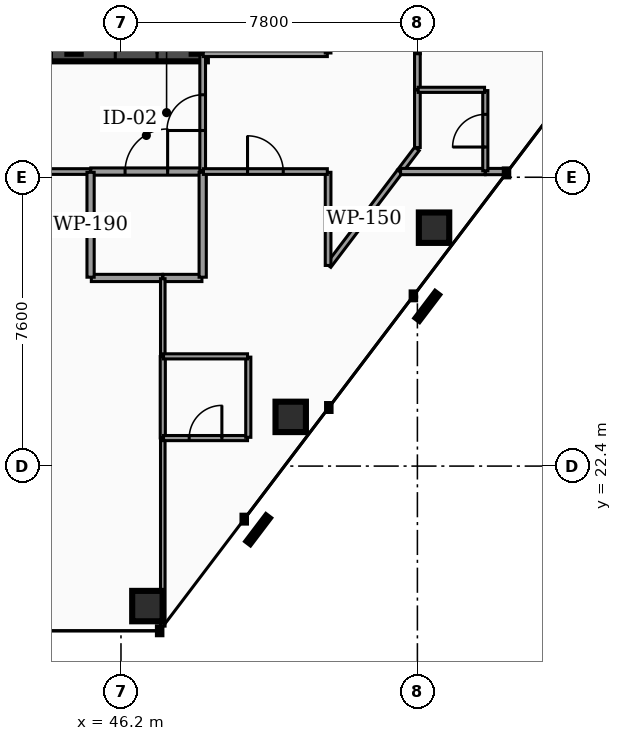
"""IFC4 building model, lengths in metres.
Left out: names, types, materials, properties, quantities, classifications, styles, units other than length and angle.
Written with IfcOpenShell. Run it as: python <this file> out.ifc"""

import sys

from ifc_helpers import new_model, si_unit, direction, frame, frame_2d, origin, origin_2d, place, context, subcontext, project, spatial, rectangle, hollow_rectangle, extrude, element, fill, save


model = new_model("IFC4")
c1 = context("Model", 3, precision=1e-05, world=origin(), true_north=direction((0.0, 1.0)))
c2 = subcontext(c1, "Body", "Model", "MODEL_VIEW")
j1 = project(units=[si_unit("LENGTHUNIT", "METRE"), si_unit("PLANEANGLEUNIT", "RADIAN")], contexts=[c1])
p1 = place(None, origin())
s1 = spatial("IfcSite", under=j1, at=p1, CompositionType="ELEMENT")
p2 = place(p1, origin())
s2 = spatial("IfcBuilding", under=s1, at=p2, CompositionType="ELEMENT")
p3 = place(p2, frame((0.0, 0.0, 123.42)))
s3 = spatial("IfcBuildingStorey", under=s2, at=p3, CompositionType="ELEMENT", Elevation=123.42)
p4 = place(p3, frame((28.4, 33.25, 0.0), z_axis=(0.0, 0.0, 1.0), x_axis=(1.0, 0.0, 0.0)))
e1 = element("IfcWall", 1, at=p4, inside=s3, PredefinedType="SHEAR", context=c2, shape_type="SweptSolid", body=[
    extrude(rectangle(XDim=20.06, YDim=0.4, at=frame_2d((10.03, 0.0))), origin(), (0.0, 0.0, 1.0), 3.5),
])
p5 = place(p4, frame((4.03, 0.0, 0.0)))
e2 = element("IfcOpeningElement", 2, at=p5, cuts=e1, PredefinedType="OPENING", context=c2, shape_type="SweptSolid", body=[
    extrude(rectangle(XDim=1.1, YDim=2.15, at=frame_2d((0.55, 1.075))), frame((0.0, 0.21, 0.0), z_axis=(0.0, -1.0, 0.0), x_axis=(1.0, 0.0, 0.0)), (0.0, 0.0, 1.0), 0.42),
])
p6 = place(p4, frame((14.87, 0.0, 0.0)))
e3 = element("IfcOpeningElement", 3, at=p6, cuts=e1, PredefinedType="OPENING", context=c2, shape_type="SweptSolid", body=[
    extrude(rectangle(XDim=1.1, YDim=2.15, at=frame_2d((0.55, 1.075))), frame((0.0, 0.21, 0.0), z_axis=(0.0, -1.0, 0.0), x_axis=(1.0, 0.0, 0.0)), (0.0, 0.0, 1.0), 0.42),
])
p7 = place(p4, frame((5.95, 0.0, 0.0)))
e4 = element("IfcOpeningElement", 4, at=p7, cuts=e1, PredefinedType="OPENING", context=c2, shape_type="SweptSolid", body=[
    extrude(rectangle(XDim=1.0, YDim=2.1, at=frame_2d((0.5, 1.05))), frame((0.0, 0.21, 0.0), z_axis=(0.0, -1.0, 0.0), x_axis=(1.0, 0.0, 0.0)), (0.0, 0.0, 1.0), 0.42),
])
p8 = place(p4, frame((7.65, 0.0, 0.0)))
e5 = element("IfcOpeningElement", 5, at=p8, cuts=e1, PredefinedType="OPENING", context=c2, shape_type="SweptSolid", body=[
    extrude(rectangle(XDim=1.0, YDim=2.1, at=frame_2d((0.5, 1.05))), frame((0.0, 0.21, 0.0), z_axis=(0.0, -1.0, 0.0), x_axis=(1.0, 0.0, 0.0)), (0.0, 0.0, 1.0), 0.42),
])
p9 = place(p4, frame((1.31, 0.0, 0.0)))
e6 = element("IfcOpeningElement", 6, at=p9, cuts=e1, PredefinedType="OPENING", context=c2, shape_type="SweptSolid", body=[
    extrude(rectangle(XDim=1.1, YDim=2.2, at=frame_2d((0.55, 1.1))), frame((0.0, 0.21, 0.0), z_axis=(0.0, -1.0, 0.0), x_axis=(1.0, 0.0, 0.0)), (0.0, 0.0, 1.0), 0.42),
])
p10 = place(p4, frame((9.44, 0.0, 0.0)))
e7 = element("IfcOpeningElement", 7, at=p10, cuts=e1, PredefinedType="OPENING", context=c2, shape_type="SweptSolid", body=[
    extrude(rectangle(XDim=1.12, YDim=2.05, at=frame_2d((0.56, 1.025))), frame((0.0, 0.21, 0.0), z_axis=(0.0, -1.0, 0.0), x_axis=(1.0, 0.0, 0.0)), (0.0, 0.0, 1.0), 0.42),
])
p11 = place(p4, frame((17.65, 0.0, 0.0)))
e8 = element("IfcOpeningElement", 8, at=p11, cuts=e1, PredefinedType="OPENING", context=c2, shape_type="SweptSolid", body=[
    extrude(rectangle(XDim=1.1, YDim=2.2, at=frame_2d((0.55, 1.1))), frame((0.0, 0.21, 0.0), z_axis=(0.0, -1.0, 0.0), x_axis=(1.0, 0.0, 0.0)), (0.0, 0.0, 1.0), 0.42),
])
p12 = place(p3, frame((44.965, 33.25, 0.0), z_axis=(0.0, 0.0, 1.0), x_axis=(0.0, 1.0, 0.0)))
e9 = element("IfcWall", 9, at=p12, inside=s3, PredefinedType="SHEAR", context=c2, shape_type="SweptSolid", body=[
    extrude(rectangle(XDim=10.2, YDim=0.35, at=frame_2d((5.1, 0.0))), origin(), (0.0, 0.0, 1.0), 3.5),
])
p13 = place(p3, frame((48.26, 33.25, 0.0), z_axis=(0.0, 0.0, 1.0), x_axis=(0.0, 1.0, 0.0)))
e10 = element("IfcWall", 10, at=p13, inside=s3, PredefinedType="SHEAR", context=c2, shape_type="SweptSolid", body=[
    extrude(rectangle(XDim=10.2, YDim=0.4, at=frame_2d((5.1, 0.0))), origin(), (0.0, 0.0, 1.0), 3.5),
])
for number, where, z_axis, x_axis in (
    (11, (46.895, 18.716, 0.0), (0.0, 0.0, 1.0), (1.0, 0.0, 0.0)),
    (12, (50.666, 23.695, 0.0), (0.0, 0.0, 1.0), (1.0, 0.0, 0.0)),
    (13, (54.438, 28.673, 0.0), (0.0, 0.0, 1.0), (1.0, 0.0, 0.0)),
):
    element("IfcColumn", number, at=place(p3, frame(where, z_axis=z_axis, x_axis=x_axis)), inside=s3, PredefinedType="COLUMN", context=c2, shape_type="SweptSolid", body=[
        extrude(hollow_rectangle(XDim=0.8, YDim=0.8, WallThickness=0.04, at=origin_2d()), origin(), (0.0, 0.0, 1.0), 3.5),
    ])
p14 = place(p3, frame((45.405, 30.15, 0.0), z_axis=(0.0, 0.0, 1.0), x_axis=(1.0, 0.0, 0.0)))
e14 = element("IfcWall", 14, at=p14, inside=s3, PredefinedType="PARTITIONING", context=c2, shape_type="SweptSolid", body=[
    extrude(rectangle(XDim=2.925, YDim=0.19, at=frame_2d((1.462, 0.0))), origin(), (0.0, 0.0, 1.0), 2.457),
])
p15 = place(p14, frame((0.903, 0.0, 0.0)))
e15 = element("IfcOpeningElement", 15, at=p15, cuts=e14, PredefinedType="OPENING", context=c2, shape_type="SweptSolid", body=[
    extrude(rectangle(XDim=1.12, YDim=2.05, at=frame_2d((0.56, 1.025))), frame((0.0, 0.105, 0.0), z_axis=(0.0, -1.0, 0.0), x_axis=(1.0, 0.0, 0.0)), (0.0, 0.0, 1.0), 0.21),
])
p16 = place(p3, frame((48.35, 30.17, 0.0), z_axis=(0.0, 0.0, 1.0), x_axis=(0.0, 1.0, 0.0)))
e16 = element("IfcWall", 16, at=p16, inside=s3, PredefinedType="PARTITIONING", context=c2, shape_type="SweptSolid", body=[
    extrude(rectangle(XDim=3.06, YDim=0.15, at=frame_2d((1.53, 0.0))), origin(), (0.0, 0.0, 1.0), 2.457),
])
p17 = place(p16, frame((1.06, 0.0, 0.0)))
e17 = element("IfcOpeningElement", 17, at=p17, cuts=e16, PredefinedType="OPENING", context=c2, shape_type="SweptSolid", body=[
    extrude(rectangle(XDim=0.94, YDim=2.05, at=frame_2d((0.47, 1.025))), frame((0.0, 0.085, 0.0), z_axis=(0.0, -1.0, 0.0), x_axis=(1.0, 0.0, 0.0)), (0.0, 0.0, 1.0), 0.17),
])
p18 = place(p3, frame((35.385, 30.15, 0.0), z_axis=(0.0, 0.0, 1.0), x_axis=(1.0, 0.0, 0.0)))
e18 = element("IfcWall", 18, at=p18, inside=s3, PredefinedType="PARTITIONING", context=c2, shape_type="SweptSolid", body=[
    extrude(rectangle(XDim=10.01, YDim=0.15, at=frame_2d((5.005, 0.0))), origin(), (0.0, 0.0, 1.0), 2.457),
])
p19 = place(p18, frame((7.935, 0.0, 0.0)))
e19 = element("IfcOpeningElement", 19, at=p19, cuts=e18, PredefinedType="OPENING", context=c2, shape_type="SweptSolid", body=[
    extrude(rectangle(XDim=0.94, YDim=2.05, at=frame_2d((0.47, 1.025))), frame((0.0, 0.085, 0.0), z_axis=(0.0, -1.0, 0.0), x_axis=(1.0, 0.0, 0.0)), (0.0, 0.0, 1.0), 0.17),
])
p20 = place(p3, frame((45.42, 27.35, 0.0), z_axis=(0.0, 0.0, 1.0), x_axis=(1.0, 0.0, 0.0)))
e20 = element("IfcWall", 20, at=p20, inside=s3, PredefinedType="PARTITIONING", context=c2, shape_type="SweptSolid", body=[
    extrude(rectangle(XDim=1.875, YDim=0.19, at=frame_2d((0.938, 0.0))), origin(), (0.0, 0.0, 1.0), 2.457),
])
p21 = place(p3, frame((45.4, 27.37, 0.0), z_axis=(0.0, 0.0, 1.0), x_axis=(0.0, 1.0, 0.0)))
e21 = element("IfcWall", 21, at=p21, inside=s3, PredefinedType="PARTITIONING", context=c2, shape_type="SweptSolid", body=[
    extrude(rectangle(XDim=2.76, YDim=0.19, at=frame_2d((1.38, 0.0))), origin(), (0.0, 0.0, 1.0), 2.457),
])
p22 = place(p3, frame((47.305, 27.35, 0.0), z_axis=(0.0, 0.0, 1.0), x_axis=(1.0, 0.0, 0.0)))
e22 = element("IfcWall", 22, at=p22, inside=s3, PredefinedType="PARTITIONING", context=c2, shape_type="SweptSolid", body=[
    extrude(rectangle(XDim=1.025, YDim=0.19, at=frame_2d((0.513, 0.0))), origin(), (0.0, 0.0, 1.0), 2.457),
])
p23 = place(p3, frame((48.35, 27.37, 0.0), z_axis=(0.0, 0.0, 1.0), x_axis=(0.0, 1.0, 0.0)))
e23 = element("IfcWall", 23, at=p23, inside=s3, PredefinedType="PARTITIONING", context=c2, shape_type="SweptSolid", body=[
    extrude(rectangle(XDim=2.76, YDim=0.19, at=frame_2d((1.38, 0.0))), origin(), (0.0, 0.0, 1.0), 2.457),
])
p24 = place(p3, frame((51.662, 27.675, 0.0), z_axis=(0.0, 0.0, 1.0), x_axis=(0.603831940294, 0.797111653334, 0.0)))
e24 = element("IfcWall", 24, at=p24, inside=s3, PredefinedType="PARTITIONING", context=c2, shape_type="SweptSolid", body=[
    extrude(rectangle(XDim=3.104, YDim=0.15, at=frame_2d((1.552, 0.0))), origin(), (0.0, 0.0, 1.0), 2.457),
])
p25 = place(p3, frame((51.65, 27.679, 0.0), z_axis=(0.0, 0.0, 1.0), x_axis=(0.0, 1.0, 0.0)))
e25 = element("IfcWall", 25, at=p25, inside=s3, PredefinedType="PARTITIONING", context=c2, shape_type="SweptSolid", body=[
    extrude(rectangle(XDim=2.451, YDim=0.15, at=frame_2d((1.225, 0.0))), origin(), (0.0, 0.0, 1.0), 2.457),
])
p26 = place(p3, frame((48.37, 30.15, 0.0), z_axis=(0.0, 0.0, 1.0), x_axis=(1.0, 0.0, 0.0)))
e26 = element("IfcWall", 26, at=p26, inside=s3, PredefinedType="PARTITIONING", context=c2, shape_type="SweptSolid", body=[
    extrude(rectangle(XDim=3.26, YDim=0.15, at=frame_2d((1.63, 0.0))), origin(), (0.0, 0.0, 1.0), 2.457),
])
p27 = place(p26, frame((1.16, 0.0, 0.0)))
e27 = element("IfcOpeningElement", 27, at=p27, cuts=e26, PredefinedType="OPENING", context=c2, shape_type="SweptSolid", body=[
    extrude(rectangle(XDim=0.94, YDim=2.05, at=frame_2d((0.47, 1.025))), frame((0.0, 0.085, 0.0), z_axis=(0.0, -1.0, 0.0), x_axis=(1.0, 0.0, 0.0)), (0.0, 0.0, 1.0), 0.17),
])
p28 = place(p3, frame((54.0, 33.25, 0.0), z_axis=(0.0, 0.0, 1.0), x_axis=(0.0, 1.0, 0.0)))
e28 = element("IfcWall", 28, at=p28, inside=s3, PredefinedType="PARTITIONING", context=c2, shape_type="SweptSolid", body=[
    extrude(rectangle(XDim=6.423, YDim=0.15, at=frame_2d((3.212, 0.0))), origin(), (0.0, 0.0, 1.0), 2.457),
])
p29 = place(p28, frame((2.742, 0.0, 0.0)))
e29 = element("IfcOpeningElement", 29, at=p29, cuts=e28, PredefinedType="OPENING", context=c2, shape_type="SweptSolid", body=[
    extrude(rectangle(XDim=0.94, YDim=2.05, at=frame_2d((0.47, 1.025))), frame((0.0, 0.085, 0.0), z_axis=(0.0, -1.0, 0.0), x_axis=(1.0, 0.0, 0.0)), (0.0, 0.0, 1.0), 0.17),
])
p30 = place(p3, frame((54.0, 32.305, 0.0), z_axis=(0.0, 0.0, 1.0), x_axis=(0.0, 1.0, 0.0)))
e30 = element("IfcWall", 30, at=p30, inside=s3, PredefinedType="PARTITIONING", context=c2, shape_type="SweptSolid", body=[
    extrude(rectangle(XDim=0.945, YDim=0.15, at=frame_2d((0.473, 0.0))), origin(), (0.0, 0.0, 1.0), 2.457),
])
p31 = place(p3, frame((54.0, 30.781, 0.0), z_axis=(0.0, 0.0, 1.0), x_axis=(0.0, 1.0, 0.0)))
e31 = element("IfcWall", 31, at=p31, inside=s3, PredefinedType="PARTITIONING", context=c2, shape_type="SweptSolid", body=[
    extrude(rectangle(XDim=1.514, YDim=0.15, at=frame_2d((0.757, 0.0))), origin(), (0.0, 0.0, 1.0), 2.457),
])
p32 = place(p3, frame((53.54, 30.154, 0.0), z_axis=(0.0, 0.0, 1.0), x_axis=(0.603680225987, 0.797226557982, 0.0)))
e32 = element("IfcWall", 32, at=p32, inside=s3, PredefinedType="PARTITIONING", context=c2, shape_type="SweptSolid", body=[
    extrude(rectangle(XDim=0.742, YDim=0.15, at=frame_2d((0.371, 0.0))), origin(), (0.0, 0.0, 1.0), 2.457),
])
p33 = place(p3, frame((48.365, 33.25, 0.0), z_axis=(0.0, 0.0, 1.0), x_axis=(1.0, 0.0, 0.0)))
e33 = element("IfcWall", 33, at=p33, inside=s3, PredefinedType="PARTITIONING", context=c2, shape_type="SweptSolid", body=[
    extrude(rectangle(XDim=3.265, YDim=0.15, at=frame_2d((1.632, 0.0))), origin(), (0.0, 0.0, 1.0), 2.457),
])
p34 = place(p3, frame((51.65, 33.27, 0.0), z_axis=(0.0, 0.0, 1.0), x_axis=(0.0, 1.0, 0.0)))
e34 = element("IfcWall", 34, at=p34, inside=s3, PredefinedType="PARTITIONING", context=c2, shape_type="SweptSolid", body=[
    extrude(rectangle(XDim=1.969, YDim=0.15, at=frame_2d((0.985, 0.0))), origin(), (0.0, 0.0, 1.0), 2.457),
])
p35 = place(p3, frame((47.3, 25.292, 0.0), z_axis=(0.0, 0.0, 1.0), x_axis=(0.0, 1.0, 0.0)))
e35 = element("IfcWall", 35, at=p35, inside=s3, PredefinedType="PARTITIONING", context=c2, shape_type="SweptSolid", body=[
    extrude(rectangle(XDim=2.038, YDim=0.12, at=frame_2d((1.019, 0.0))), origin(), (0.0, 0.0, 1.0), 2.457),
])
p36 = place(p3, frame((47.3, 18.19, 0.0), z_axis=(0.0, 0.0, 1.0), x_axis=(0.0, 1.0, 0.0)))
e36 = element("IfcWall", 36, at=p36, inside=s3, PredefinedType="PARTITIONING", context=c2, shape_type="SweptSolid", body=[
    extrude(rectangle(XDim=4.942, YDim=0.12, at=frame_2d((2.471, 0.0))), origin(), (0.0, 0.0, 1.0), 2.457),
])
p37 = place(p3, frame((47.3, 23.142, 0.0), z_axis=(0.0, 0.0, 1.0), x_axis=(0.0, 1.0, 0.0)))
e37 = element("IfcWall", 37, at=p37, inside=s3, PredefinedType="PARTITIONING", context=c2, shape_type="SweptSolid", body=[
    extrude(rectangle(XDim=2.14, YDim=0.135, at=frame_2d((1.07, 0.0))), origin(), (0.0, 0.0, 1.0), 2.457),
])
p38 = place(p3, frame((47.32, 23.137, 0.0), z_axis=(0.0, 0.0, 1.0), x_axis=(1.0, 0.0, 0.0)))
e38 = element("IfcWall", 38, at=p38, inside=s3, PredefinedType="PARTITIONING", context=c2, shape_type="SweptSolid", body=[
    extrude(rectangle(XDim=2.21, YDim=0.135, at=frame_2d((1.105, 0.0))), origin(), (0.0, 0.0, 1.0), 2.457),
])
p39 = place(p38, frame((0.675, 0.0, 0.0)))
e39 = element("IfcOpeningElement", 39, at=p39, cuts=e38, PredefinedType="OPENING", context=c2, shape_type="SweptSolid", body=[
    extrude(rectangle(XDim=0.86, YDim=2.05, at=frame_2d((0.43, 1.025))), frame((0.0, 0.077, 0.0), z_axis=(0.0, -1.0, 0.0), x_axis=(1.0, 0.0, 0.0)), (0.0, 0.0, 1.0), 0.155),
])
p40 = place(p3, frame((49.55, 23.157, 0.0), z_axis=(0.0, 0.0, 1.0), x_axis=(0.0, 1.0, 0.0)))
e40 = element("IfcWall", 40, at=p40, inside=s3, PredefinedType="PARTITIONING", context=c2, shape_type="SweptSolid", body=[
    extrude(rectangle(XDim=2.11, YDim=0.135, at=frame_2d((1.055, 0.0))), origin(), (0.0, 0.0, 1.0), 2.457),
])
p41 = place(p3, frame((47.32, 25.287, 0.0), z_axis=(0.0, 0.0, 1.0), x_axis=(1.0, 0.0, 0.0)))
e41 = element("IfcWall", 41, at=p41, inside=s3, PredefinedType="PARTITIONING", context=c2, shape_type="SweptSolid", body=[
    extrude(rectangle(XDim=2.21, YDim=0.135, at=frame_2d((1.105, 0.0))), origin(), (0.0, 0.0, 1.0), 2.457),
])
p42 = place(p3, frame((55.792, 30.15, 0.0), z_axis=(0.0, 0.0, 1.0), x_axis=(1.0, 0.0, 0.0)))
e42 = element("IfcWall", 42, at=p42, inside=s3, PredefinedType="PARTITIONING", context=c2, shape_type="SweptSolid", body=[
    extrude(rectangle(XDim=0.565, YDim=0.165, at=frame_2d((0.283, 0.0))), origin(), (0.0, 0.0, 1.0), 2.457),
])
p43 = place(p3, frame((53.557, 30.15, 0.0), z_axis=(0.0, 0.0, 1.0), x_axis=(1.0, 0.0, 0.0)))
e43 = element("IfcWall", 43, at=p43, inside=s3, PredefinedType="PARTITIONING", context=c2, shape_type="SweptSolid", body=[
    extrude(rectangle(XDim=2.225, YDim=0.165, at=frame_2d((1.113, 0.0))), origin(), (0.0, 0.0, 1.0), 2.457),
])
p44 = place(p3, frame((55.787, 30.17, 0.0), z_axis=(0.0, 0.0, 1.0), x_axis=(0.0, 1.0, 0.0)))
e44 = element("IfcWall", 44, at=p44, inside=s3, PredefinedType="PARTITIONING", context=c2, shape_type="SweptSolid", body=[
    extrude(rectangle(XDim=2.11, YDim=0.135, at=frame_2d((1.055, 0.0))), origin(), (0.0, 0.0, 1.0), 2.457),
])
p45 = place(p44, frame((0.625, 0.0, 0.0)))
e45 = element("IfcOpeningElement", 45, at=p45, cuts=e44, PredefinedType="OPENING", context=c2, shape_type="SweptSolid", body=[
    extrude(rectangle(XDim=0.86, YDim=2.05, at=frame_2d((0.43, 1.025))), frame((0.0, 0.077, 0.0), z_axis=(0.0, -1.0, 0.0), x_axis=(1.0, 0.0, 0.0)), (0.0, 0.0, 1.0), 0.155),
])
p46 = place(p3, frame((54.02, 32.3, 0.0), z_axis=(0.0, 0.0, 1.0), x_axis=(1.0, 0.0, 0.0)))
e46 = element("IfcWall", 46, at=p46, inside=s3, PredefinedType="PARTITIONING", context=c2, shape_type="SweptSolid", body=[
    extrude(rectangle(XDim=1.747, YDim=0.135, at=frame_2d((0.874, 0.0))), origin(), (0.0, 0.0, 1.0), 2.457),
])
p47 = place(p11, origin())
e47 = element("IfcDoor", 47, at=p47, inside=s3, OperationType="SINGLE_SWING_RIGHT", PredefinedType="DOOR", context=c2, shape_type="SweptSolid", body=[
    extrude(rectangle(XDim=1.1, YDim=2.2, at=frame_2d((0.55, 1.1))), frame((0.0, 0.025, 0.0), z_axis=(0.0, -1.0, 0.0), x_axis=(1.0, 0.0, 0.0)), (0.0, 0.0, 1.0), 0.05),
])
fill(e8, e47)
p48 = place(p15, origin())
e48 = element("IfcDoor", 48, at=p48, inside=s3, OperationType="SINGLE_SWING_RIGHT", PredefinedType="DOOR", context=c2, shape_type="SweptSolid", body=[
    extrude(rectangle(XDim=1.12, YDim=2.05, at=frame_2d((0.56, 1.025))), frame((0.0, 0.025, 0.0), z_axis=(0.0, -1.0, 0.0), x_axis=(1.0, 0.0, 0.0)), (0.0, 0.0, 1.0), 0.05),
])
fill(e15, e48)
p49 = place(p17, origin())
e49 = element("IfcDoor", 49, at=p49, inside=s3, OperationType="SINGLE_SWING_LEFT", PredefinedType="DOOR", context=c2, shape_type="SweptSolid", body=[
    extrude(rectangle(XDim=0.94, YDim=2.05, at=frame_2d((0.47, 1.025))), frame((0.0, 0.025, 0.0), z_axis=(0.0, -1.0, 0.0), x_axis=(1.0, 0.0, 0.0)), (0.0, 0.0, 1.0), 0.05),
])
fill(e17, e49)
p50 = place(p27, origin())
e50 = element("IfcDoor", 50, at=p50, inside=s3, OperationType="SINGLE_SWING_LEFT", PredefinedType="DOOR", context=c2, shape_type="SweptSolid", body=[
    extrude(rectangle(XDim=0.94, YDim=2.05, at=frame_2d((0.47, 1.025))), frame((0.0, 0.025, 0.0), z_axis=(0.0, -1.0, 0.0), x_axis=(1.0, 0.0, 0.0)), (0.0, 0.0, 1.0), 0.05),
])
fill(e27, e50)
p51 = place(p39, origin())
e51 = element("IfcDoor", 51, at=p51, inside=s3, OperationType="SINGLE_SWING_RIGHT", PredefinedType="DOOR", context=c2, shape_type="SweptSolid", body=[
    extrude(rectangle(XDim=0.86, YDim=2.05, at=frame_2d((0.43, 1.025))), frame((0.0, 0.025, 0.0), z_axis=(0.0, -1.0, 0.0), x_axis=(1.0, 0.0, 0.0)), (0.0, 0.0, 1.0), 0.05),
])
fill(e39, e51)
p52 = place(p45, origin())
e52 = element("IfcDoor", 52, at=p52, inside=s3, OperationType="SINGLE_SWING_LEFT", PredefinedType="DOOR", context=c2, shape_type="SweptSolid", body=[
    extrude(rectangle(XDim=0.86, YDim=2.05, at=frame_2d((0.43, 1.025))), frame((0.0, 0.025, 0.0), z_axis=(0.0, -1.0, 0.0), x_axis=(1.0, 0.0, 0.0)), (0.0, 0.0, 1.0), 0.05),
])
fill(e45, e52)
save(model, sys.argv[1])
